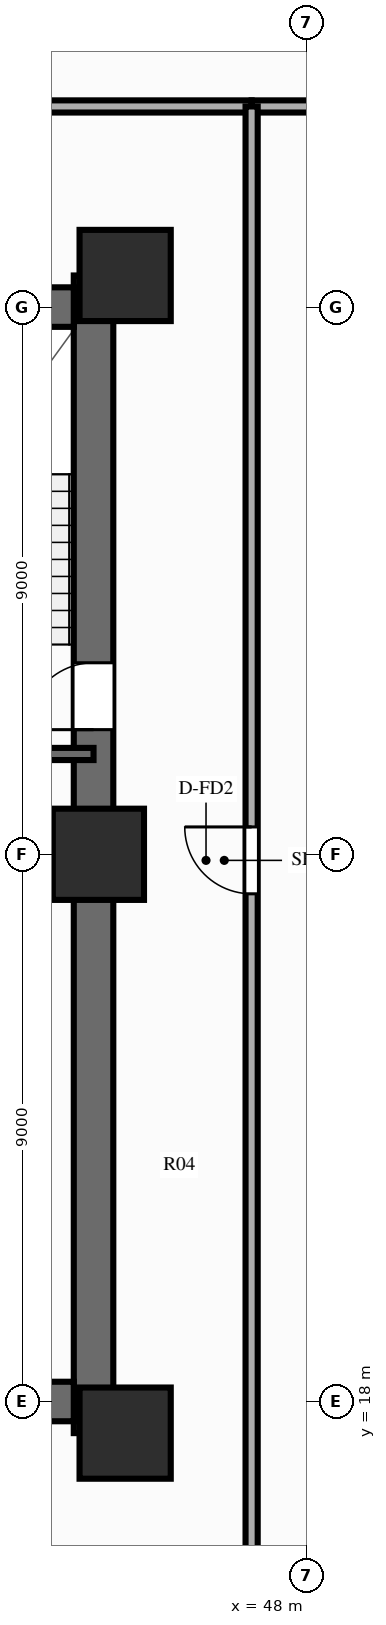
"""IFC4 building model, lengths in metres.
Left out: names, types, materials, properties, quantities, classifications, styles, units other than length and angle.
Written with IfcOpenShell. Run it as: python <this file> out.ifc"""

import sys

from ifc_helpers import new_model, si_unit, direction, frame, frame_2d, origin, origin_2d, place, context, subcontext, project, spatial, rectangle, extrude, source, transform, mapped, element, fill, save


model = new_model("IFC4")
c1 = context("Model", 3, precision=1e-05, world=origin(), true_north=direction((0.0, 1.0)))
c2 = subcontext(c1, "Body", "Model", "MODEL_VIEW")
j1 = project(units=[si_unit("LENGTHUNIT", "METRE"), si_unit("PLANEANGLEUNIT", "RADIAN")], contexts=[c1])
p1 = place(None, origin())
s1 = spatial("IfcSite", under=j1, at=p1, CompositionType="ELEMENT")
p2 = place(p1, origin())
s2 = spatial("IfcBuilding", under=s1, at=p2, CompositionType="ELEMENT")
p3 = place(p2, frame((0.0, 0.0, 70.4)))
s3 = spatial("IfcBuildingStorey", under=s2, at=p3, CompositionType="ELEMENT", Elevation=70.4)
p4 = place(p3, frame((44.5, 17.48, 0.0), z_axis=(0.0, 0.0, 1.0), x_axis=(0.0, 1.0, 0.0)))
e1 = element("IfcWall", 1, at=p4, inside=s3, PredefinedType="SHEAR", context=c2, shape_type="SweptSolid", body=[
    extrude(rectangle(XDim=19.04, YDim=0.65, at=frame_2d((9.52, 0.0))), origin(), (0.0, 0.0, 1.0), 3.95),
])
p5 = place(p4, frame((12.67, 0.0, 0.0), z_axis=(0.0, 0.0, 1.0), x_axis=(-1.0, 0.0, 0.0)))
e2 = element("IfcOpeningElement", 2, at=p5, cuts=e1, PredefinedType="OPENING", context=c2, shape_type="SweptSolid", body=[
    extrude(rectangle(XDim=1.1, YDim=2.15, at=frame_2d((0.55, 1.075))), frame((0.0, 0.337, 0.0), z_axis=(0.0, -1.0, 0.0), x_axis=(1.0, 0.0, 0.0)), (0.0, 0.0, 1.0), 0.674),
])
p6 = place(p3, frame((31.825, 18.0, 0.0), z_axis=(0.0, 0.0, 1.0), x_axis=(1.0, 0.0, 0.0)))
e3 = element("IfcWall", 3, at=p6, inside=s3, PredefinedType="SHEAR", context=c2, shape_type="SweptSolid", body=[
    extrude(rectangle(XDim=12.35, YDim=0.65, at=frame_2d((6.175, 0.0))), origin(), (0.0, 0.0, 1.0), 3.95),
])
p7 = place(p3, frame((31.825, 36.0, 0.0), z_axis=(0.0, 0.0, 1.0), x_axis=(1.0, 0.0, 0.0)))
e4 = element("IfcWall", 4, at=p7, inside=s3, PredefinedType="SHEAR", context=c2, shape_type="SweptSolid", body=[
    extrude(rectangle(XDim=12.35, YDim=0.65, at=frame_2d((6.175, 0.0))), origin(), (0.0, 0.0, 1.0), 3.95),
])
p8 = place(p7, frame((5.125, 0.0, 0.0), z_axis=(0.0, 0.0, 1.0), x_axis=(-1.0, 0.0, 0.0)))
e5 = element("IfcOpeningElement", 5, at=p8, cuts=e4, PredefinedType="OPENING", context=c2, shape_type="SweptSolid", body=[
    extrude(rectangle(XDim=1.4, YDim=2.15, at=frame_2d((0.7, 1.075))), frame((0.0, 0.337, 0.0), z_axis=(0.0, -1.0, 0.0), x_axis=(1.0, 0.0, 0.0)), (0.0, 0.0, 1.0), 0.674),
])
m1 = source(origin(), c2, "Body", "SweptSolid", [
    extrude(rectangle(XDim=1.5, YDim=1.5, at=origin_2d()), origin(), (0.0, 0.0, 1.0), 3.95),
])
for number, where, z_axis, x_axis in (
    (6, (45.02, 17.48, 0.0), (0.0, 0.0, 1.0), (1.0, 0.0, 0.0)),
    (7, (45.02, 36.52, 0.0), (0.0, 0.0, 1.0), (1.0, 0.0, 0.0)),
    (8, (44.58, 27.0, 0.0), (0.0, 0.0, 1.0), (1.0, 0.0, 0.0)),
):
    element("IfcColumn", number, at=place(p3, frame(where, z_axis=z_axis, x_axis=x_axis)), inside=s3, PredefinedType="COLUMN", context=c2, shape_type="MappedRepresentation", body=[
        mapped(m1, transform((0.0, 0.0, 0.0), scale=1.0)),
    ])
p9 = place(p3, frame((40.57, 28.65, 0.0), z_axis=(0.0, 0.0, 1.0), x_axis=(1.0, 0.0, 0.0)))
e9 = element("IfcWall", 9, at=p9, inside=s3, PredefinedType="SOLIDWALL", context=c2, shape_type="SweptSolid", body=[
    extrude(rectangle(XDim=3.93, YDim=0.2, at=frame_2d((1.965, 0.0))), origin(), (0.0, 0.0, 1.0), 3.69),
])
p10 = place(p3, frame((28.9, 39.3, 0.0), z_axis=(0.0, 0.0, 1.0), x_axis=(1.0, 0.0, 0.0)))
e10 = element("IfcWall", 10, at=p10, inside=s3, PredefinedType="PARTITIONING", context=c2, shape_type="SweptSolid", body=[
    extrude(rectangle(XDim=18.2, YDim=0.2, at=frame_2d((9.1, 0.0))), origin(), (0.0, 0.0, 1.0), 3.61),
])
p11 = place(p10, frame((8.55, 0.0, 0.0)))
e11 = element("IfcOpeningElement", 11, at=p11, cuts=e10, PredefinedType="OPENING", context=c2, shape_type="SweptSolid", body=[
    extrude(rectangle(XDim=1.1, YDim=2.15, at=frame_2d((0.55, 1.075))), frame((0.0, 0.112, 0.0), z_axis=(0.0, -1.0, 0.0), x_axis=(1.0, 0.0, 0.0)), (0.0, 0.0, 1.0), 0.224),
])
p12 = place(p3, frame((47.1, 39.3, 0.0), z_axis=(0.0, 0.0, 1.0), x_axis=(1.0, 0.0, 0.0)))
e12 = element("IfcWall", 12, at=p12, inside=s3, PredefinedType="PARTITIONING", context=c2, shape_type="SweptSolid", body=[
    extrude(rectangle(XDim=13.4, YDim=0.2, at=frame_2d((6.7, 0.0))), origin(), (0.0, 0.0, 1.0), 3.61),
])
p13 = place(p3, frame((47.1, 14.5, 0.0), z_axis=(0.0, 0.0, 1.0), x_axis=(0.0, 1.0, 0.0)))
e13 = element("IfcWall", 13, at=p13, inside=s3, PredefinedType="PARTITIONING", context=c2, shape_type="SweptSolid", body=[
    extrude(rectangle(XDim=24.8, YDim=0.2, at=frame_2d((12.4, 0.0))), origin(), (0.0, 0.0, 1.0), 3.61),
])
p14 = place(p13, frame((11.85, 0.0, 0.0)))
e14 = element("IfcOpeningElement", 14, at=p14, cuts=e13, PredefinedType="OPENING", context=c2, shape_type="SweptSolid", body=[
    extrude(rectangle(XDim=1.1, YDim=2.15, at=frame_2d((0.55, 1.075))), frame((0.0, 0.112, 0.0), z_axis=(0.0, -1.0, 0.0), x_axis=(1.0, 0.0, 0.0)), (0.0, 0.0, 1.0), 0.224),
])
m2 = source(origin(), c2, "Body", "SweptSolid", [
    extrude(rectangle(XDim=1.1, YDim=2.15, at=frame_2d((0.55, 1.075))), frame((0.0, 0.025, 0.0), z_axis=(0.0, -1.0, 0.0), x_axis=(1.0, 0.0, 0.0)), (0.0, 0.0, 1.0), 0.05),
])
p15 = place(p5, origin())
e15 = element("IfcDoor", 15, at=p15, inside=s3, OperationType="SINGLE_SWING_RIGHT", PredefinedType="DOOR", context=c2, shape_type="MappedRepresentation", body=[
    mapped(m2, transform((0.0, 0.0, 0.0), scale=1.0)),
])
fill(e2, e15)
p16 = place(p14, origin())
e16 = element("IfcDoor", 16, at=p16, inside=s3, OperationType="SINGLE_SWING_RIGHT", PredefinedType="DOOR", context=c2, shape_type="MappedRepresentation", body=[
    mapped(m2, transform((0.0, 0.0, 0.0), scale=1.0)),
])
fill(e14, e16)
save(model, sys.argv[1])
